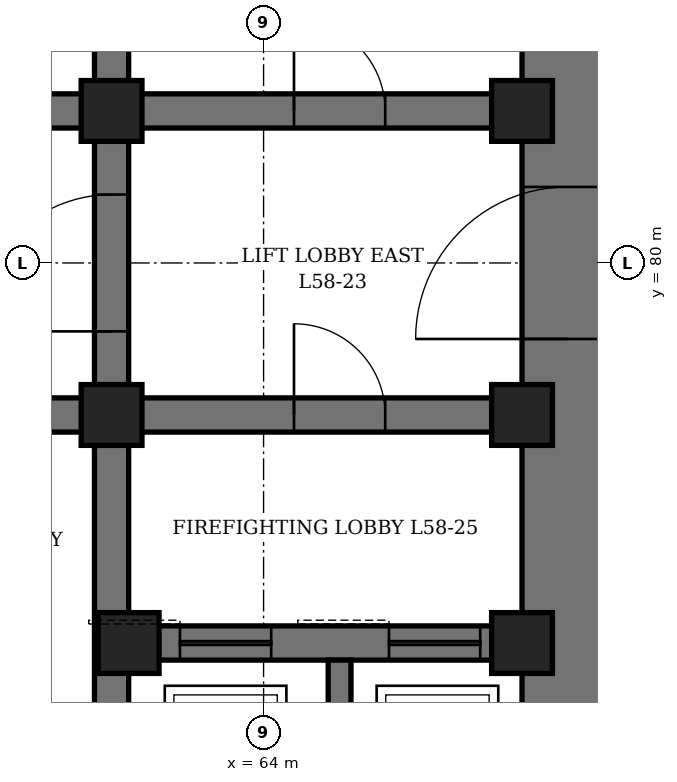
"""IFC4 building model, lengths in metres.
Left out: names, types, materials, properties, quantities, classifications, styles, units other than length and angle.
Written with IfcOpenShell. Run it as: python <this file> out.ifc"""

import sys

from ifc_helpers import new_model, si_unit, direction, frame, frame_2d, origin, origin_2d, place, context, subcontext, project, spatial, rectangle, hollow_rectangle, extrude, element, fill, save


model = new_model("IFC4")
c1 = context("Model", 3, precision=1e-05, world=origin(), true_north=direction((0.0, 1.0)))
c2 = subcontext(c1, "Body", "Model", "MODEL_VIEW")
j1 = project(units=[si_unit("LENGTHUNIT", "METRE"), si_unit("PLANEANGLEUNIT", "RADIAN")], contexts=[c1])
p1 = place(None, origin())
s1 = spatial("IfcSite", under=j1, at=p1, CompositionType="ELEMENT")
p2 = place(p1, origin())
s2 = spatial("IfcBuilding", under=s1, at=p2, CompositionType="ELEMENT")
p3 = place(p2, frame((0.0, 0.0, 258.7)))
s3 = spatial("IfcBuildingStorey", under=s2, at=p3, CompositionType="ELEMENT", Elevation=258.7)
p4 = place(p3, frame((68.0, 70.4, 0.0), z_axis=(0.0, 0.0, 1.0), x_axis=(0.0, 1.0, 0.0)))
e1 = element("IfcWall", 1, at=p4, inside=s3, PredefinedType="SHEAR", context=c2, shape_type="SweptSolid", body=[
    extrude(rectangle(XDim=19.2, YDim=1.2, at=frame_2d((9.6, 0.0))), origin(), (0.0, 0.0, 1.0), 4.2),
])
p5 = place(p4, frame((8.6, 0.0, 0.0)))
e2 = element("IfcOpeningElement", 2, at=p5, cuts=e1, PredefinedType="OPENING", context=c2, shape_type="SweptSolid", body=[
    extrude(rectangle(XDim=2.0, YDim=2.4, at=frame_2d((1.0, 1.2))), frame((0.0, 0.61, 0.0), z_axis=(0.0, -1.0, 0.0), x_axis=(1.0, 0.0, 0.0)), (0.0, 0.0, 1.0), 1.22),
])
p6 = place(p3, frame((62.0, 71.6, 0.0), z_axis=(0.0, 0.0, 1.0), x_axis=(0.0, 1.0, 0.0)))
e3 = element("IfcWall", 3, at=p6, inside=s3, PredefinedType="SHEAR", context=c2, shape_type="SweptSolid", body=[
    extrude(rectangle(XDim=16.8, YDim=0.45, at=frame_2d((8.4, 0.0))), origin(), (0.0, 0.0, 1.0), 4.2),
])
p7 = place(p6, frame((7.5, 0.0, 0.0)))
e4 = element("IfcOpeningElement", 4, at=p7, cuts=e3, PredefinedType="OPENING", context=c2, shape_type="SweptSolid", body=[
    extrude(rectangle(XDim=1.8, YDim=2.4, at=frame_2d((0.9, 1.2))), frame((0.0, 0.235, 0.0), z_axis=(0.0, -1.0, 0.0), x_axis=(1.0, 0.0, 0.0)), (0.0, 0.0, 1.0), 0.47),
])
p8 = place(p3, frame((62.225, 75.0, 0.0), z_axis=(0.0, 0.0, 1.0), x_axis=(1.0, 0.0, 0.0)))
e5 = element("IfcWall", 5, at=p8, inside=s3, PredefinedType="SHEAR", context=c2, shape_type="SweptSolid", body=[
    extrude(rectangle(XDim=5.175, YDim=0.45, at=frame_2d((2.587, 0.0))), origin(), (0.0, 0.0, 1.0), 4.2),
])
p9 = place(p8, frame((0.675, 0.0, 0.0)))
e6 = element("IfcOpeningElement", 6, at=p9, cuts=e5, PredefinedType="OPENING", context=c2, shape_type="SweptSolid", body=[
    extrude(rectangle(XDim=1.2, YDim=2.2, at=frame_2d((0.6, 1.1))), frame((0.0, 0.235, 0.0), z_axis=(0.0, -1.0, 0.0), x_axis=(1.0, 0.0, 0.0)), (0.0, 0.0, 1.0), 0.47),
])
p10 = place(p8, frame((3.425, 0.0, 0.0)))
e7 = element("IfcOpeningElement", 7, at=p10, cuts=e5, PredefinedType="OPENING", context=c2, shape_type="SweptSolid", body=[
    extrude(rectangle(XDim=1.2, YDim=2.2, at=frame_2d((0.6, 1.1))), frame((0.0, 0.235, 0.0), z_axis=(0.0, -1.0, 0.0), x_axis=(1.0, 0.0, 0.0)), (0.0, 0.0, 1.0), 0.47),
])
p11 = place(p3, frame((62.225, 78.0, 0.0), z_axis=(0.0, 0.0, 1.0), x_axis=(1.0, 0.0, 0.0)))
e8 = element("IfcWall", 8, at=p11, inside=s3, PredefinedType="SHEAR", context=c2, shape_type="SweptSolid", body=[
    extrude(rectangle(XDim=5.175, YDim=0.45, at=frame_2d((2.587, 0.0))), origin(), (0.0, 0.0, 1.0), 4.2),
])
p12 = place(p11, frame((2.175, 0.0, 0.0)))
e9 = element("IfcOpeningElement", 9, at=p12, cuts=e8, PredefinedType="OPENING", context=c2, shape_type="SweptSolid", body=[
    extrude(rectangle(XDim=1.2, YDim=2.1, at=frame_2d((0.6, 1.05))), frame((0.0, 0.235, 0.0), z_axis=(0.0, -1.0, 0.0), x_axis=(1.0, 0.0, 0.0)), (0.0, 0.0, 1.0), 0.47),
])
p13 = place(p3, frame((62.225, 82.0, 0.0), z_axis=(0.0, 0.0, 1.0), x_axis=(1.0, 0.0, 0.0)))
e10 = element("IfcWall", 10, at=p13, inside=s3, PredefinedType="SHEAR", context=c2, shape_type="SweptSolid", body=[
    extrude(rectangle(XDim=5.175, YDim=0.45, at=frame_2d((2.587, 0.0))), origin(), (0.0, 0.0, 1.0), 4.2),
])
p14 = place(p13, frame((2.175, 0.0, 0.0)))
e11 = element("IfcOpeningElement", 11, at=p14, cuts=e10, PredefinedType="OPENING", context=c2, shape_type="SweptSolid", body=[
    extrude(rectangle(XDim=1.2, YDim=2.1, at=frame_2d((0.6, 1.05))), frame((0.0, 0.235, 0.0), z_axis=(0.0, -1.0, 0.0), x_axis=(1.0, 0.0, 0.0)), (0.0, 0.0, 1.0), 0.47),
])
p15 = place(p3, frame((50.225, 78.0, 0.0), z_axis=(0.0, 0.0, 1.0), x_axis=(1.0, 0.0, 0.0)))
e12 = element("IfcWall", 12, at=p15, inside=s3, PredefinedType="SHEAR", context=c2, shape_type="SweptSolid", body=[
    extrude(rectangle(XDim=11.55, YDim=0.45, at=frame_2d((5.775, 0.0))), origin(), (0.0, 0.0, 1.0), 4.2),
])
p16 = place(p15, frame((0.825, 0.0, 0.0)))
e13 = element("IfcOpeningElement", 13, at=p16, cuts=e12, PredefinedType="OPENING", context=c2, shape_type="SweptSolid", body=[
    extrude(rectangle(XDim=0.9, YDim=2.1, at=frame_2d((0.45, 1.05))), frame((0.0, 0.235, 0.0), z_axis=(0.0, -1.0, 0.0), x_axis=(1.0, 0.0, 0.0)), (0.0, 0.0, 1.0), 0.47),
])
p17 = place(p15, frame((3.825, 0.0, 0.0)))
e14 = element("IfcOpeningElement", 14, at=p17, cuts=e12, PredefinedType="OPENING", context=c2, shape_type="SweptSolid", body=[
    extrude(rectangle(XDim=0.9, YDim=2.1, at=frame_2d((0.45, 1.05))), frame((0.0, 0.235, 0.0), z_axis=(0.0, -1.0, 0.0), x_axis=(1.0, 0.0, 0.0)), (0.0, 0.0, 1.0), 0.47),
])
p18 = place(p15, frame((6.825, 0.0, 0.0)))
e15 = element("IfcOpeningElement", 15, at=p18, cuts=e12, PredefinedType="OPENING", context=c2, shape_type="SweptSolid", body=[
    extrude(rectangle(XDim=0.9, YDim=2.1, at=frame_2d((0.45, 1.05))), frame((0.0, 0.235, 0.0), z_axis=(0.0, -1.0, 0.0), x_axis=(1.0, 0.0, 0.0)), (0.0, 0.0, 1.0), 0.47),
])
p19 = place(p15, frame((9.825, 0.0, 0.0)))
e16 = element("IfcOpeningElement", 16, at=p19, cuts=e12, PredefinedType="OPENING", context=c2, shape_type="SweptSolid", body=[
    extrude(rectangle(XDim=0.9, YDim=2.1, at=frame_2d((0.45, 1.05))), frame((0.0, 0.235, 0.0), z_axis=(0.0, -1.0, 0.0), x_axis=(1.0, 0.0, 0.0)), (0.0, 0.0, 1.0), 0.47),
])
p20 = place(p3, frame((50.225, 82.0, 0.0), z_axis=(0.0, 0.0, 1.0), x_axis=(1.0, 0.0, 0.0)))
e17 = element("IfcWall", 17, at=p20, inside=s3, PredefinedType="SHEAR", context=c2, shape_type="SweptSolid", body=[
    extrude(rectangle(XDim=11.55, YDim=0.45, at=frame_2d((5.775, 0.0))), origin(), (0.0, 0.0, 1.0), 4.2),
])
p21 = place(p20, frame((0.825, 0.0, 0.0)))
e18 = element("IfcOpeningElement", 18, at=p21, cuts=e17, PredefinedType="OPENING", context=c2, shape_type="SweptSolid", body=[
    extrude(rectangle(XDim=0.9, YDim=2.1, at=frame_2d((0.45, 1.05))), frame((0.0, 0.235, 0.0), z_axis=(0.0, -1.0, 0.0), x_axis=(1.0, 0.0, 0.0)), (0.0, 0.0, 1.0), 0.47),
])
p22 = place(p20, frame((3.825, 0.0, 0.0)))
e19 = element("IfcOpeningElement", 19, at=p22, cuts=e17, PredefinedType="OPENING", context=c2, shape_type="SweptSolid", body=[
    extrude(rectangle(XDim=0.9, YDim=2.1, at=frame_2d((0.45, 1.05))), frame((0.0, 0.235, 0.0), z_axis=(0.0, -1.0, 0.0), x_axis=(1.0, 0.0, 0.0)), (0.0, 0.0, 1.0), 0.47),
])
p23 = place(p20, frame((6.825, 0.0, 0.0)))
e20 = element("IfcOpeningElement", 20, at=p23, cuts=e17, PredefinedType="OPENING", context=c2, shape_type="SweptSolid", body=[
    extrude(rectangle(XDim=0.9, YDim=2.1, at=frame_2d((0.45, 1.05))), frame((0.0, 0.235, 0.0), z_axis=(0.0, -1.0, 0.0), x_axis=(1.0, 0.0, 0.0)), (0.0, 0.0, 1.0), 0.47),
])
p24 = place(p20, frame((9.825, 0.0, 0.0)))
e21 = element("IfcOpeningElement", 21, at=p24, cuts=e17, PredefinedType="OPENING", context=c2, shape_type="SweptSolid", body=[
    extrude(rectangle(XDim=0.9, YDim=2.1, at=frame_2d((0.45, 1.05))), frame((0.0, 0.235, 0.0), z_axis=(0.0, -1.0, 0.0), x_axis=(1.0, 0.0, 0.0)), (0.0, 0.0, 1.0), 0.47),
])
p25 = place(p3, frame((65.0, 71.6, 0.0), z_axis=(0.0, 0.0, 1.0), x_axis=(0.0, 1.0, 0.0)))
e22 = element("IfcWall", 22, at=p25, inside=s3, PredefinedType="SHEAR", context=c2, shape_type="SweptSolid", body=[
    extrude(rectangle(XDim=3.175, YDim=0.3, at=frame_2d((1.587, 0.0))), origin(), (0.0, 0.0, 1.0), 4.2),
])
for number, where, z_axis, x_axis in (
    (23, (62.0, 78.0, 0.0), (0.0, 0.0, 1.0), (1.0, 0.0, 0.0)),
    (24, (62.0, 82.0, 0.0), (0.0, 0.0, 1.0), (1.0, 0.0, 0.0)),
    (25, (62.225, 75.0, 0.0), (0.0, 0.0, 1.0), (1.0, 0.0, 0.0)),
    (26, (67.4, 75.0, 0.0), (0.0, 0.0, 1.0), (1.0, 0.0, 0.0)),
    (27, (67.4, 78.0, 0.0), (0.0, 0.0, 1.0), (1.0, 0.0, 0.0)),
    (28, (67.4, 82.0, 0.0), (0.0, 0.0, 1.0), (1.0, 0.0, 0.0)),
):
    element("IfcColumn", number, at=place(p3, frame(where, z_axis=z_axis, x_axis=x_axis)), inside=s3, PredefinedType="COLUMN", context=c2, shape_type="SweptSolid", body=[
        extrude(hollow_rectangle(XDim=0.8, YDim=0.8, WallThickness=0.1, at=origin_2d()), origin(), (0.0, 0.0, 1.0), 4.2),
    ])
p26 = place(p14, origin())
e29 = element("IfcDoor", 29, at=p26, inside=s3, OperationType="SINGLE_SWING_LEFT", PredefinedType="DOOR", context=c2, shape_type="SweptSolid", body=[
    extrude(rectangle(XDim=1.2, YDim=2.1, at=frame_2d((0.6, 1.05))), frame((0.0, 0.225, 0.0), z_axis=(0.0, -1.0, 0.0), x_axis=(1.0, 0.0, 0.0)), (0.0, 0.0, 1.0), 0.449),
])
fill(e11, e29)
p27 = place(p5, origin())
e30 = element("IfcDoor", 30, at=p27, inside=s3, OperationType="DOUBLE_DOOR_SINGLE_SWING", PredefinedType="DOOR", context=c2, shape_type="SweptSolid", body=[
    extrude(rectangle(XDim=2.0, YDim=2.4, at=frame_2d((1.0, 1.2))), frame((0.0, 0.35, 0.0), z_axis=(0.0, -1.0, 0.0), x_axis=(1.0, 0.0, 0.0)), (0.0, 0.0, 1.0), 0.7),
])
fill(e2, e30)
p28 = place(p7, origin())
e31 = element("IfcDoor", 31, at=p28, inside=s3, OperationType="DOUBLE_DOOR_SINGLE_SWING", PredefinedType="DOOR", context=c2, shape_type="SweptSolid", body=[
    extrude(rectangle(XDim=1.8, YDim=2.4, at=frame_2d((0.9, 1.2))), frame((0.0, 0.225, 0.0), z_axis=(0.0, -1.0, 0.0), x_axis=(1.0, 0.0, 0.0)), (0.0, 0.0, 1.0), 0.449),
])
fill(e4, e31)
p29 = place(p12, origin())
e32 = element("IfcDoor", 32, at=p29, inside=s3, OperationType="SINGLE_SWING_RIGHT", PredefinedType="DOOR", context=c2, shape_type="SweptSolid", body=[
    extrude(rectangle(XDim=1.2, YDim=2.1, at=frame_2d((0.6, 1.05))), frame((0.0, 0.225, 0.0), z_axis=(0.0, -1.0, 0.0), x_axis=(1.0, 0.0, 0.0)), (0.0, 0.0, 1.0), 0.449),
])
fill(e9, e32)
p30 = place(p9, origin())
e33 = element("IfcDoor", 33, at=p30, inside=s3, OperationType="SLIDING_TO_LEFT", PredefinedType="DOOR", context=c2, shape_type="SweptSolid", body=[
    extrude(rectangle(XDim=1.2, YDim=2.2, at=frame_2d((0.6, 1.1))), frame((0.0, 0.225, 0.0), z_axis=(0.0, -1.0, 0.0), x_axis=(1.0, 0.0, 0.0)), (0.0, 0.0, 1.0), 0.449),
])
fill(e6, e33)
p31 = place(p10, origin())
e34 = element("IfcDoor", 34, at=p31, inside=s3, OperationType="SLIDING_TO_LEFT", PredefinedType="DOOR", context=c2, shape_type="SweptSolid", body=[
    extrude(rectangle(XDim=1.2, YDim=2.2, at=frame_2d((0.6, 1.1))), frame((0.0, 0.225, 0.0), z_axis=(0.0, -1.0, 0.0), x_axis=(1.0, 0.0, 0.0)), (0.0, 0.0, 1.0), 0.449),
])
fill(e7, e34)
save(model, sys.argv[1])
